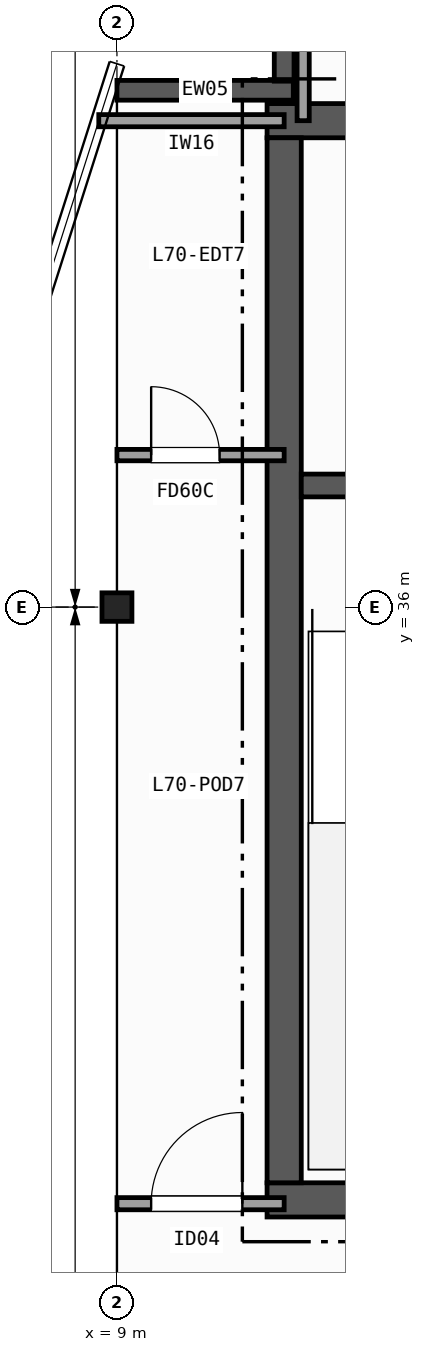
"""IFC4 building model, lengths in metres.
Left out: names, types, materials, properties, quantities, classifications, styles, units other than length and angle.
Written with IfcOpenShell. Run it as: python <this file> out.ifc"""

import sys

from ifc_helpers import new_model, si_unit, direction, frame, frame_2d, origin, origin_2d, place, context, subcontext, project, spatial, rectangle, i_section, extrude, element, fill, save


model = new_model("IFC4")
c1 = context("Model", 3, precision=1e-05, world=origin(), true_north=direction((0.0, 1.0)))
c2 = subcontext(c1, "Body", "Model", "MODEL_VIEW")
j1 = project(units=[si_unit("LENGTHUNIT", "METRE"), si_unit("PLANEANGLEUNIT", "RADIAN")], contexts=[c1])
p1 = place(None, origin())
s1 = spatial("IfcSite", under=j1, at=p1, CompositionType="ELEMENT")
p2 = place(p1, origin())
s2 = spatial("IfcBuilding", under=s1, at=p2, CompositionType="ELEMENT")
p3 = place(p2, frame((0.0, 0.0, 277.8)))
s3 = spatial("IfcBuildingStorey", under=s2, at=p3, CompositionType="ELEMENT", Elevation=277.8)
p4 = place(p3, frame((9.0, 36.0, 0.0), z_axis=(0.0, 0.0, 1.0), x_axis=(1.0, 0.0, 0.0)))
e1 = element("IfcColumn", 1, at=p4, inside=s3, PredefinedType="COLUMN", context=c2, shape_type="SweptSolid", body=[
    extrude(i_section(OverallWidth=0.394, OverallDepth=0.375, WebThickness=0.017, FlangeThickness=0.028, FilletRadius=0.015, at=origin_2d()), origin(), (0.0, 0.0, 1.0), 3.7),
])
p5 = place(p3, frame((9.0, 42.8, 0.0), z_axis=(0.0, 0.0, 1.0), x_axis=(1.0, 0.0, 0.0)))
e2 = element("IfcWall", 2, at=p5, inside=s3, PredefinedType="SOLIDWALL", context=c2, shape_type="SweptSolid", body=[
    extrude(rectangle(XDim=2.32, YDim=0.26, at=frame_2d((1.16, 0.0))), origin(), (0.0, 0.0, 1.0), 3.42),
])
p6 = place(p3, frame((11.2, 42.92, 0.0), z_axis=(0.0, 0.0, 1.0), x_axis=(0.0, 1.0, 0.0)))
e3 = element("IfcWall", 3, at=p6, inside=s3, PredefinedType="SOLIDWALL", context=c2, shape_type="SweptSolid", body=[
    extrude(rectangle(XDim=2.08, YDim=0.26, at=frame_2d((1.04, 0.0))), origin(), (0.0, 0.0, 1.0), 3.42),
])
p7 = place(p3, frame((10.975, 28.2, 0.0), z_axis=(0.0, 0.0, 1.0), x_axis=(1.0, 0.0, 0.0)))
e4 = element("IfcWall", 4, at=p7, inside=s3, PredefinedType="SHEAR", context=c2, shape_type="SweptSolid", body=[
    extrude(rectangle(XDim=13.85, YDim=0.45, at=frame_2d((6.925, 0.0))), origin(), (0.0, 0.0, 1.0), 3.42),
])
p8 = place(p3, frame((24.825, 42.4, 0.0), z_axis=(0.0, 0.0, 1.0), x_axis=(-1.0, 0.0, 0.0)))
e5 = element("IfcWall", 5, at=p8, inside=s3, PredefinedType="SHEAR", context=c2, shape_type="SweptSolid", body=[
    extrude(rectangle(XDim=13.85, YDim=0.45, at=frame_2d((6.925, 0.0))), origin(), (0.0, 0.0, 1.0), 3.42),
])
p9 = place(p8, frame((10.025, 0.0, 0.0)))
e6 = element("IfcOpeningElement", 6, at=p9, cuts=e5, PredefinedType="OPENING", context=c2, shape_type="SweptSolid", body=[
    extrude(rectangle(XDim=1.2, YDim=2.15, at=frame_2d((0.6, 1.075))), frame((0.0, 0.235, 0.0), z_axis=(0.0, -1.0, 0.0), x_axis=(1.0, 0.0, 0.0)), (0.0, 0.0, 1.0), 0.47),
])
p10 = place(p8, frame((2.975, 0.0, 0.0)))
e7 = element("IfcOpeningElement", 7, at=p10, cuts=e5, PredefinedType="OPENING", context=c2, shape_type="SweptSolid", body=[
    extrude(rectangle(XDim=0.9, YDim=2.1, at=frame_2d((0.45, 1.05))), frame((0.0, 0.235, 0.0), z_axis=(0.0, -1.0, 0.0), x_axis=(1.0, 0.0, 0.0)), (0.0, 0.0, 1.0), 0.47),
])
p11 = place(p3, frame((11.2, 42.175, 0.0), z_axis=(0.0, 0.0, 1.0), x_axis=(0.0, -1.0, 0.0)))
e8 = element("IfcWall", 8, at=p11, inside=s3, PredefinedType="SHEAR", context=c2, shape_type="SweptSolid", body=[
    extrude(rectangle(XDim=13.75, YDim=0.45, at=frame_2d((6.875, 0.0))), origin(), (0.0, 0.0, 1.0), 3.42),
])
p12 = place(p3, frame((17.77, 37.6, 0.0), z_axis=(0.0, 0.0, 1.0), x_axis=(-1.0, 0.0, 0.0)))
e9 = element("IfcWall", 9, at=p12, inside=s3, PredefinedType="SHEAR", context=c2, shape_type="SweptSolid", body=[
    extrude(rectangle(XDim=6.345, YDim=0.3, at=frame_2d((3.172, 0.0))), origin(), (0.0, 0.0, 1.0), 3.42),
])
p13 = place(p12, frame((4.22, 0.0, 0.0)))
e10 = element("IfcOpeningElement", 10, at=p13, cuts=e9, PredefinedType="OPENING", context=c2, shape_type="SweptSolid", body=[
    extrude(rectangle(XDim=1.2, YDim=2.15, at=frame_2d((0.6, 1.075))), frame((0.0, 0.16, 0.0), z_axis=(0.0, -1.0, 0.0), x_axis=(1.0, 0.0, 0.0)), (0.0, 0.0, 1.0), 0.32),
])
p14 = place(p12, frame((1.12, 0.0, 0.0)))
e11 = element("IfcOpeningElement", 11, at=p14, cuts=e9, PredefinedType="OPENING", context=c2, shape_type="SweptSolid", body=[
    extrude(rectangle(XDim=1.2, YDim=2.15, at=frame_2d((0.6, 1.075))), frame((0.0, 0.16, 0.0), z_axis=(0.0, -1.0, 0.0), x_axis=(1.0, 0.0, 0.0)), (0.0, 0.0, 1.0), 0.32),
])
p15 = place(p3, frame((9.0, 28.15, 0.0), z_axis=(0.0, 0.0, 1.0), x_axis=(1.0, 0.0, 0.0)))
e12 = element("IfcWall", 12, at=p15, inside=s3, PredefinedType="PARTITIONING", context=c2, shape_type="SweptSolid", body=[
    extrude(rectangle(XDim=2.2, YDim=0.16, at=frame_2d((1.1, 0.0))), origin(), (0.0, 0.0, 1.0), 2.707),
])
p16 = place(p15, frame((0.45, 0.0, 0.0)))
e13 = element("IfcOpeningElement", 13, at=p16, cuts=e12, PredefinedType="OPENING", context=c2, shape_type="SweptSolid", body=[
    extrude(rectangle(XDim=1.2, YDim=2.15, at=frame_2d((0.6, 1.075))), frame((0.0, 0.09, 0.0), z_axis=(0.0, -1.0, 0.0), x_axis=(1.0, 0.0, 0.0)), (0.0, 0.0, 1.0), 0.18),
])
p17 = place(p3, frame((8.761, 42.4, 0.0), z_axis=(0.0, 0.0, 1.0), x_axis=(1.0, 0.0, 0.0)))
e14 = element("IfcWall", 14, at=p17, inside=s3, PredefinedType="PARTITIONING", context=c2, shape_type="SweptSolid", body=[
    extrude(rectangle(XDim=2.439, YDim=0.16, at=frame_2d((1.219, 0.0))), origin(), (0.0, 0.0, 1.0), 3.42),
])
p18 = place(p3, frame((11.45, 42.4, 0.0), z_axis=(0.0, 0.0, 1.0), x_axis=(0.0, 1.0, 0.0)))
e15 = element("IfcWall", 15, at=p18, inside=s3, PredefinedType="PARTITIONING", context=c2, shape_type="SweptSolid", body=[
    extrude(rectangle(XDim=2.666, YDim=0.16, at=frame_2d((1.333, 0.0))), origin(), (0.0, 0.0, 1.0), 3.42),
])
p19 = place(p3, frame((9.0, 38.0, 0.0), z_axis=(0.0, 0.0, 1.0), x_axis=(1.0, 0.0, 0.0)))
e16 = element("IfcWall", 16, at=p19, inside=s3, PredefinedType="PARTITIONING", context=c2, shape_type="SweptSolid", body=[
    extrude(rectangle(XDim=2.2, YDim=0.15, at=frame_2d((1.1, 0.0))), origin(), (0.0, 0.0, 1.0), 3.42),
])
p20 = place(p19, frame((0.45, 0.0, 0.0)))
e17 = element("IfcOpeningElement", 17, at=p20, cuts=e16, PredefinedType="OPENING", context=c2, shape_type="SweptSolid", body=[
    extrude(rectangle(XDim=0.9, YDim=2.1, at=frame_2d((0.45, 1.05))), frame((0.0, 0.085, 0.0), z_axis=(0.0, -1.0, 0.0), x_axis=(1.0, 0.0, 0.0)), (0.0, 0.0, 1.0), 0.17),
])
p21 = place(p16, origin())
e18 = element("IfcDoor", 18, at=p21, inside=s3, OperationType="SINGLE_SWING_RIGHT", PredefinedType="DOOR", context=c2, shape_type="SweptSolid", body=[
    extrude(rectangle(XDim=1.2, YDim=2.15, at=frame_2d((0.6, 1.075))), frame((0.0, 0.025, 0.0), z_axis=(0.0, -1.0, 0.0), x_axis=(1.0, 0.0, 0.0)), (0.0, 0.0, 1.0), 0.05),
])
fill(e13, e18)
p22 = place(p20, origin())
e19 = element("IfcDoor", 19, at=p22, inside=s3, OperationType="SINGLE_SWING_LEFT", PredefinedType="DOOR", context=c2, shape_type="SweptSolid", body=[
    extrude(rectangle(XDim=0.9, YDim=2.1, at=frame_2d((0.45, 1.05))), frame((0.0, 0.025, 0.0), z_axis=(0.0, -1.0, 0.0), x_axis=(1.0, 0.0, 0.0)), (0.0, 0.0, 1.0), 0.05),
])
fill(e17, e19)
save(model, sys.argv[1])
